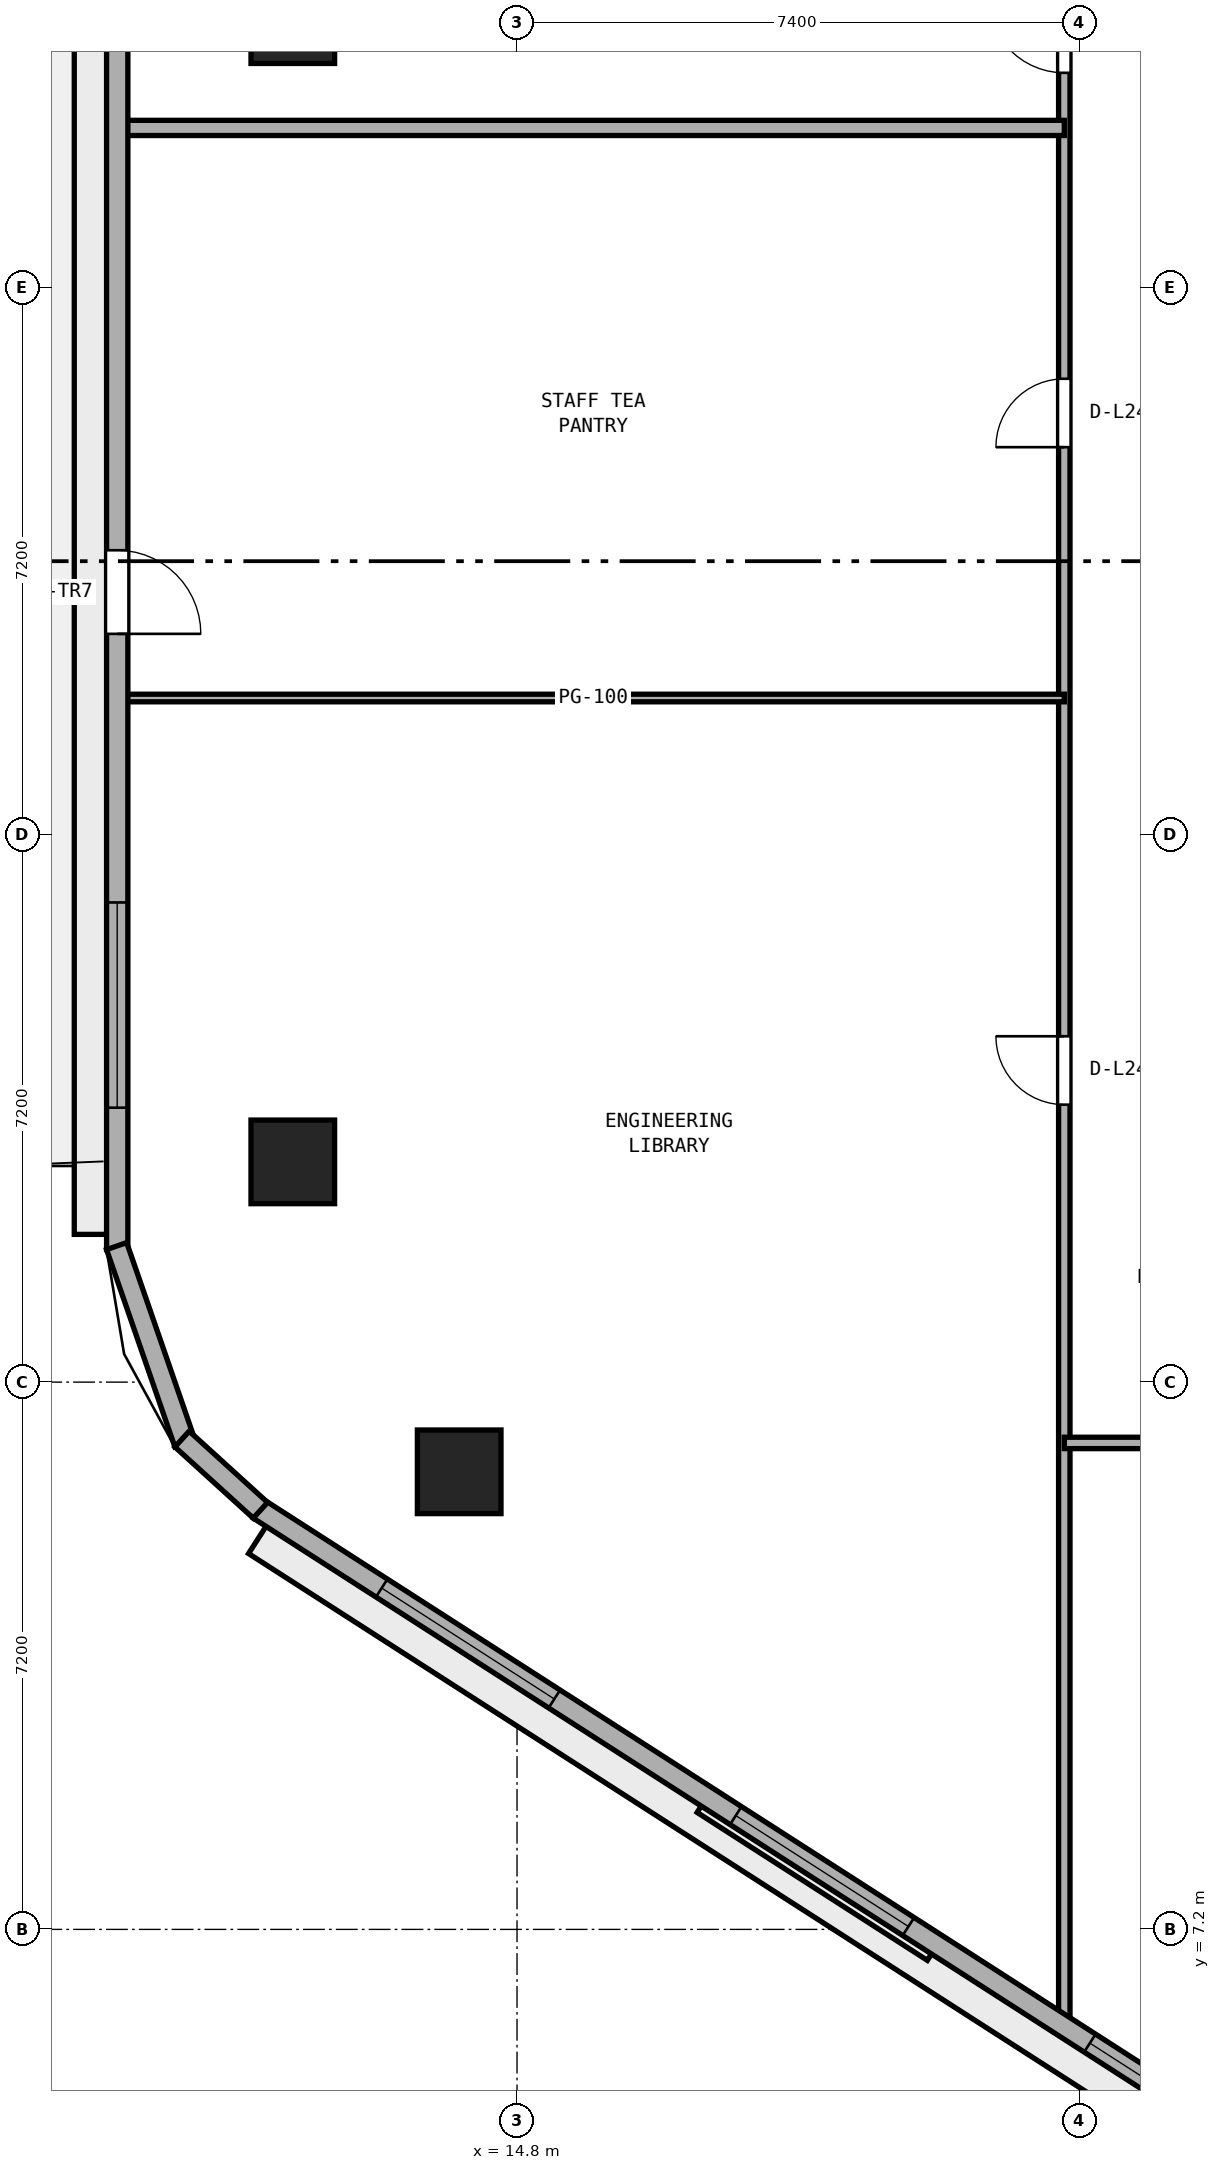
"""IFC4 building model, lengths in metres.
Left out: names, types, materials, properties, quantities, classifications, styles, units other than length and angle.
Written with IfcOpenShell. Run it as: python <this file> out.ifc"""

import sys

from ifc_helpers import new_model, si_unit, direction, frame, frame_2d, origin, origin_2d, place, context, subcontext, project, spatial, rectangle, extrude, element, fill, save


model = new_model("IFC4")
c1 = context("Model", 3, precision=1e-05, world=origin(), true_north=direction((0.0, 1.0)))
c2 = subcontext(c1, "Body", "Model", "MODEL_VIEW")
j1 = project(units=[si_unit("LENGTHUNIT", "METRE"), si_unit("PLANEANGLEUNIT", "RADIAN")], contexts=[c1])
p1 = place(None, origin())
s1 = spatial("IfcSite", under=j1, at=p1, CompositionType="ELEMENT")
p2 = place(p1, origin())
s2 = spatial("IfcBuilding", under=s1, at=p2, CompositionType="ELEMENT")
p3 = place(p2, frame((0.0, 0.0, 97.2)))
s3 = spatial("IfcBuildingStorey", under=s2, at=p3, CompositionType="ELEMENT", Elevation=97.2)
for number, where, z_axis, x_axis in (
    (1, (11.85, 32.298, 0.0), (0.0, 0.0, 1.0), (1.0, 0.0, 0.0)),
    (2, (11.85, 17.298, 0.0), (0.0, 0.0, 1.0), (1.0, 0.0, 0.0)),
    (3, (14.039, 13.22, 0.0), (0.0, 0.0, 1.0), (1.0, 0.0, 0.0)),
):
    element("IfcColumn", number, at=place(p3, frame(where, z_axis=z_axis, x_axis=x_axis)), inside=s3, PredefinedType="COLUMN", context=c2, shape_type="SweptSolid", body=[
        extrude(rectangle(XDim=1.1, YDim=1.1, at=origin_2d()), origin(), (0.0, 0.0, 1.0), 3.8),
    ])
p4 = place(p3, frame((22.0, 5.894, 0.0), z_axis=(0.0, 0.0, 1.0), x_axis=(0.0, 1.0, 0.0)))
e4 = element("IfcWall", 4, at=p4, inside=s3, PredefinedType="PARTITIONING", context=c2, shape_type="SweptSolid", body=[
    extrude(rectangle(XDim=30.906, YDim=0.15, at=frame_2d((15.453, 0.0))), origin(), (0.0, 0.0, 1.0), 3.525),
])
p5 = place(p4, frame((12.156, 0.0, 0.0)))
e5 = element("IfcOpeningElement", 5, at=p5, cuts=e4, PredefinedType="OPENING", context=c2, shape_type="SweptSolid", body=[
    extrude(rectangle(XDim=0.9, YDim=2.1, at=frame_2d((0.45, 1.05))), frame((0.0, 0.085, 0.0), z_axis=(0.0, -1.0, 0.0), x_axis=(1.0, 0.0, 0.0)), (0.0, 0.0, 1.0), 0.17),
])
p6 = place(p4, frame((20.806, 0.0, 0.0)))
e6 = element("IfcOpeningElement", 6, at=p6, cuts=e4, PredefinedType="OPENING", context=c2, shape_type="SweptSolid", body=[
    extrude(rectangle(XDim=0.9, YDim=2.1, at=frame_2d((0.45, 1.05))), frame((0.0, 0.085, 0.0), z_axis=(0.0, -1.0, 0.0), x_axis=(1.0, 0.0, 0.0)), (0.0, 0.0, 1.0), 0.17),
])
p7 = place(p4, frame((25.731, 0.0, 0.0)))
e7 = element("IfcOpeningElement", 7, at=p7, cuts=e4, PredefinedType="OPENING", context=c2, shape_type="SweptSolid", body=[
    extrude(rectangle(XDim=1.0, YDim=2.12, at=frame_2d((0.5, 1.06))), frame((0.0, 0.085, 0.0), z_axis=(0.0, -1.0, 0.0), x_axis=(1.0, 0.0, 0.0)), (0.0, 0.0, 1.0), 0.17),
])
p8 = place(p3, frame((22.0, 13.6, 0.0), z_axis=(0.0, 0.0, 1.0), x_axis=(1.0, 0.0, 0.0)))
e8 = element("IfcWall", 8, at=p8, inside=s3, PredefinedType="PARTITIONING", context=c2, shape_type="SweptSolid", body=[
    extrude(rectangle(XDim=30.0, YDim=0.15, at=frame_2d((15.0, 0.0))), origin(), (0.0, 0.0, 1.0), 3.525),
])
p9 = place(p8, frame((6.22, 0.0, 0.0)))
e9 = element("IfcOpeningElement", 9, at=p9, cuts=e8, PredefinedType="OPENING", context=c2, shape_type="SweptSolid", body=[
    extrude(rectangle(XDim=0.9, YDim=2.1, at=frame_2d((0.45, 1.05))), frame((0.0, 0.085, 0.0), z_axis=(0.0, -1.0, 0.0), x_axis=(1.0, 0.0, 0.0)), (0.0, 0.0, 1.0), 0.17),
])
p10 = place(p8, frame((20.98, 0.0, 0.0)))
e10 = element("IfcOpeningElement", 10, at=p10, cuts=e8, PredefinedType="OPENING", context=c2, shape_type="SweptSolid", body=[
    extrude(rectangle(XDim=0.9, YDim=2.1, at=frame_2d((0.45, 1.05))), frame((0.0, 0.085, 0.0), z_axis=(0.0, -1.0, 0.0), x_axis=(1.0, 0.0, 0.0)), (0.0, 0.0, 1.0), 0.17),
])
p11 = place(p3, frame((9.605, 23.4, 0.0), z_axis=(0.0, 0.0, 1.0), x_axis=(1.0, 0.0, 0.0)))
e11 = element("IfcWall", 11, at=p11, inside=s3, PredefinedType="PARTITIONING", context=c2, shape_type="SweptSolid", body=[
    extrude(rectangle(XDim=12.395, YDim=0.1, at=frame_2d((6.198, 0.0))), origin(), (0.0, 0.0, 1.0), 3.525),
])
p12 = place(p3, frame((9.605, 30.9, 0.0), z_axis=(0.0, 0.0, 1.0), x_axis=(1.0, 0.0, 0.0)))
e12 = element("IfcWall", 12, at=p12, inside=s3, PredefinedType="PARTITIONING", context=c2, shape_type="SweptSolid", body=[
    extrude(rectangle(XDim=12.395, YDim=0.2, at=frame_2d((6.198, 0.0))), origin(), (0.0, 0.0, 1.0), 3.525),
])
p13 = place(p3, frame((9.54, 33.444, 0.0), z_axis=(0.0, 0.0, 1.0), x_axis=(0.0, -1.0, 0.0)))
e13 = element("IfcWall", 13, at=p13, inside=s3, PredefinedType="STANDARD", context=c2, shape_type="SweptSolid", body=[
    extrude(rectangle(XDim=17.301, YDim=0.28, at=frame_2d((8.65, 0.0))), origin(), (0.0, 0.0, 1.0), 3.525),
])
p14 = place(p13, frame((8.1, 0.0, 0.0)))
e14 = element("IfcOpeningElement", 14, at=p14, cuts=e13, PredefinedType="OPENING", context=c2, shape_type="SweptSolid", body=[
    extrude(rectangle(XDim=1.1, YDim=2.2, at=frame_2d((0.55, 1.1))), frame((0.0, 0.15, 0.0), z_axis=(0.0, -1.0, 0.0), x_axis=(1.0, 0.0, 0.0)), (0.0, 0.0, 1.0), 0.3),
])
p15 = place(p13, frame((12.734, 0.0, 0.9)))
e15 = element("IfcOpeningElement", 15, at=p15, cuts=e13, PredefinedType="OPENING", context=c2, shape_type="SweptSolid", body=[
    extrude(rectangle(XDim=2.7, YDim=1.75, at=frame_2d((1.35, 0.875))), frame((0.0, 0.15, 0.0), z_axis=(0.0, -1.0, 0.0), x_axis=(1.0, 0.0, 0.0)), (0.0, 0.0, 1.0), 0.3),
])
p16 = place(p3, frame((11.405, 12.728, 0.0), z_axis=(0.0, 0.0, 1.0), x_axis=(0.841304564637, -0.540561402175, 0.0)))
e16 = element("IfcWall", 16, at=p16, inside=s3, PredefinedType="STANDARD", context=c2, shape_type="SweptSolid", body=[
    extrude(rectangle(XDim=17.612, YDim=0.28, at=frame_2d((8.806, 0.0))), origin(), (0.0, 0.0, 1.0), 3.525),
])
p17 = place(p16, frame((1.919, 0.0, 0.9)))
e17 = element("IfcOpeningElement", 17, at=p17, cuts=e16, PredefinedType="OPENING", context=c2, shape_type="SweptSolid", body=[
    extrude(rectangle(XDim=2.7, YDim=1.75, at=frame_2d((1.35, 0.875))), frame((0.0, 0.15, 0.0), z_axis=(0.0, -1.0, 0.0), x_axis=(1.0, 0.0, 0.0)), (0.0, 0.0, 1.0), 0.3),
])
p18 = place(p16, frame((7.456, 0.0, 0.9)))
e18 = element("IfcOpeningElement", 18, at=p18, cuts=e16, PredefinedType="OPENING", context=c2, shape_type="SweptSolid", body=[
    extrude(rectangle(XDim=2.7, YDim=1.75, at=frame_2d((1.35, 0.875))), frame((0.0, 0.15, 0.0), z_axis=(0.0, -1.0, 0.0), x_axis=(1.0, 0.0, 0.0)), (0.0, 0.0, 1.0), 0.3),
])
p19 = place(p16, frame((12.993, 0.0, 0.9)))
e19 = element("IfcOpeningElement", 19, at=p19, cuts=e16, PredefinedType="OPENING", context=c2, shape_type="SweptSolid", body=[
    extrude(rectangle(XDim=2.7, YDim=1.75, at=frame_2d((1.35, 0.875))), frame((0.0, 0.15, 0.0), z_axis=(0.0, -1.0, 0.0), x_axis=(1.0, 0.0, 0.0)), (0.0, 0.0, 1.0), 0.3),
])
p20 = place(p3, frame((9.532, 16.189, 0.0), z_axis=(0.0, 0.0, 1.0), x_axis=(0.32708309668, -0.944995580871, 0.0)))
e20 = element("IfcWall", 20, at=p20, inside=s3, PredefinedType="STANDARD", context=c2, shape_type="SweptSolid", body=[
    extrude(rectangle(XDim=2.748, YDim=0.28, at=frame_2d((1.374, 0.0))), origin(), (0.0, 0.0, 1.0), 3.525),
])
p21 = place(p3, frame((10.393, 13.651, 0.0), z_axis=(0.0, 0.0, 1.0), x_axis=(0.74003521851, -0.672568119498, 0.0)))
e21 = element("IfcWall", 21, at=p21, inside=s3, PredefinedType="STANDARD", context=c2, shape_type="SweptSolid", body=[
    extrude(rectangle(XDim=1.393, YDim=0.28, at=frame_2d((0.697, 0.0))), origin(), (0.0, 0.0, 1.0), 3.525),
])
p22 = place(p5, origin())
e22 = element("IfcDoor", 22, at=p22, inside=s3, OperationType="SINGLE_SWING_RIGHT", PredefinedType="DOOR", context=c2, shape_type="SweptSolid", body=[
    extrude(rectangle(XDim=0.9, YDim=2.1, at=frame_2d((0.45, 1.05))), frame((0.0, 0.025, 0.0), z_axis=(0.0, -1.0, 0.0), x_axis=(1.0, 0.0, 0.0)), (0.0, 0.0, 1.0), 0.05),
])
fill(e5, e22)
p23 = place(p6, origin())
e23 = element("IfcDoor", 23, at=p23, inside=s3, OperationType="SINGLE_SWING_LEFT", PredefinedType="DOOR", context=c2, shape_type="SweptSolid", body=[
    extrude(rectangle(XDim=0.9, YDim=2.1, at=frame_2d((0.45, 1.05))), frame((0.0, 0.025, 0.0), z_axis=(0.0, -1.0, 0.0), x_axis=(1.0, 0.0, 0.0)), (0.0, 0.0, 1.0), 0.05),
])
fill(e6, e23)
p24 = place(p7, origin())
e24 = element("IfcDoor", 24, at=p24, inside=s3, OperationType="SINGLE_SWING_RIGHT", PredefinedType="DOOR", context=c2, shape_type="SweptSolid", body=[
    extrude(rectangle(XDim=1.0, YDim=2.12, at=frame_2d((0.5, 1.06))), frame((0.0, 0.025, 0.0), z_axis=(0.0, -1.0, 0.0), x_axis=(1.0, 0.0, 0.0)), (0.0, 0.0, 1.0), 0.05),
])
fill(e7, e24)
p25 = place(p14, origin())
e25 = element("IfcDoor", 25, at=p25, inside=s3, OperationType="SINGLE_SWING_RIGHT", PredefinedType="DOOR", context=c2, shape_type="SweptSolid", body=[
    extrude(rectangle(XDim=1.1, YDim=2.2, at=frame_2d((0.55, 1.1))), frame((0.0, 0.025, 0.0), z_axis=(0.0, -1.0, 0.0), x_axis=(1.0, 0.0, 0.0)), (0.0, 0.0, 1.0), 0.05),
])
fill(e14, e25)
p26 = place(p15, origin())
e26 = element("IfcWindow", 26, at=p26, inside=s3, PartitioningType="SINGLE_PANEL", PredefinedType="WINDOW", context=c2, shape_type="SweptSolid", body=[
    extrude(rectangle(XDim=2.7, YDim=1.75, at=frame_2d((1.35, 0.875))), frame((0.0, 0.03, 0.0), z_axis=(0.0, -1.0, 0.0), x_axis=(1.0, 0.0, 0.0)), (0.0, 0.0, 1.0), 0.06),
])
fill(e15, e26)
p27 = place(p17, origin())
e27 = element("IfcWindow", 27, at=p27, inside=s3, PartitioningType="SINGLE_PANEL", PredefinedType="WINDOW", context=c2, shape_type="SweptSolid", body=[
    extrude(rectangle(XDim=2.7, YDim=1.75, at=frame_2d((1.35, 0.875))), frame((0.0, 0.03, 0.0), z_axis=(0.0, -1.0, 0.0), x_axis=(1.0, 0.0, 0.0)), (0.0, 0.0, 1.0), 0.06),
])
fill(e17, e27)
p28 = place(p18, origin())
e28 = element("IfcWindow", 28, at=p28, inside=s3, PartitioningType="SINGLE_PANEL", PredefinedType="WINDOW", context=c2, shape_type="SweptSolid", body=[
    extrude(rectangle(XDim=2.7, YDim=1.75, at=frame_2d((1.35, 0.875))), frame((0.0, 0.03, 0.0), z_axis=(0.0, -1.0, 0.0), x_axis=(1.0, 0.0, 0.0)), (0.0, 0.0, 1.0), 0.06),
])
fill(e18, e28)
p29 = place(p19, origin())
e29 = element("IfcWindow", 29, at=p29, inside=s3, PartitioningType="SINGLE_PANEL", PredefinedType="WINDOW", context=c2, shape_type="SweptSolid", body=[
    extrude(rectangle(XDim=2.7, YDim=1.75, at=frame_2d((1.35, 0.875))), frame((0.0, 0.03, 0.0), z_axis=(0.0, -1.0, 0.0), x_axis=(1.0, 0.0, 0.0)), (0.0, 0.0, 1.0), 0.06),
])
fill(e19, e29)
save(model, sys.argv[1])
